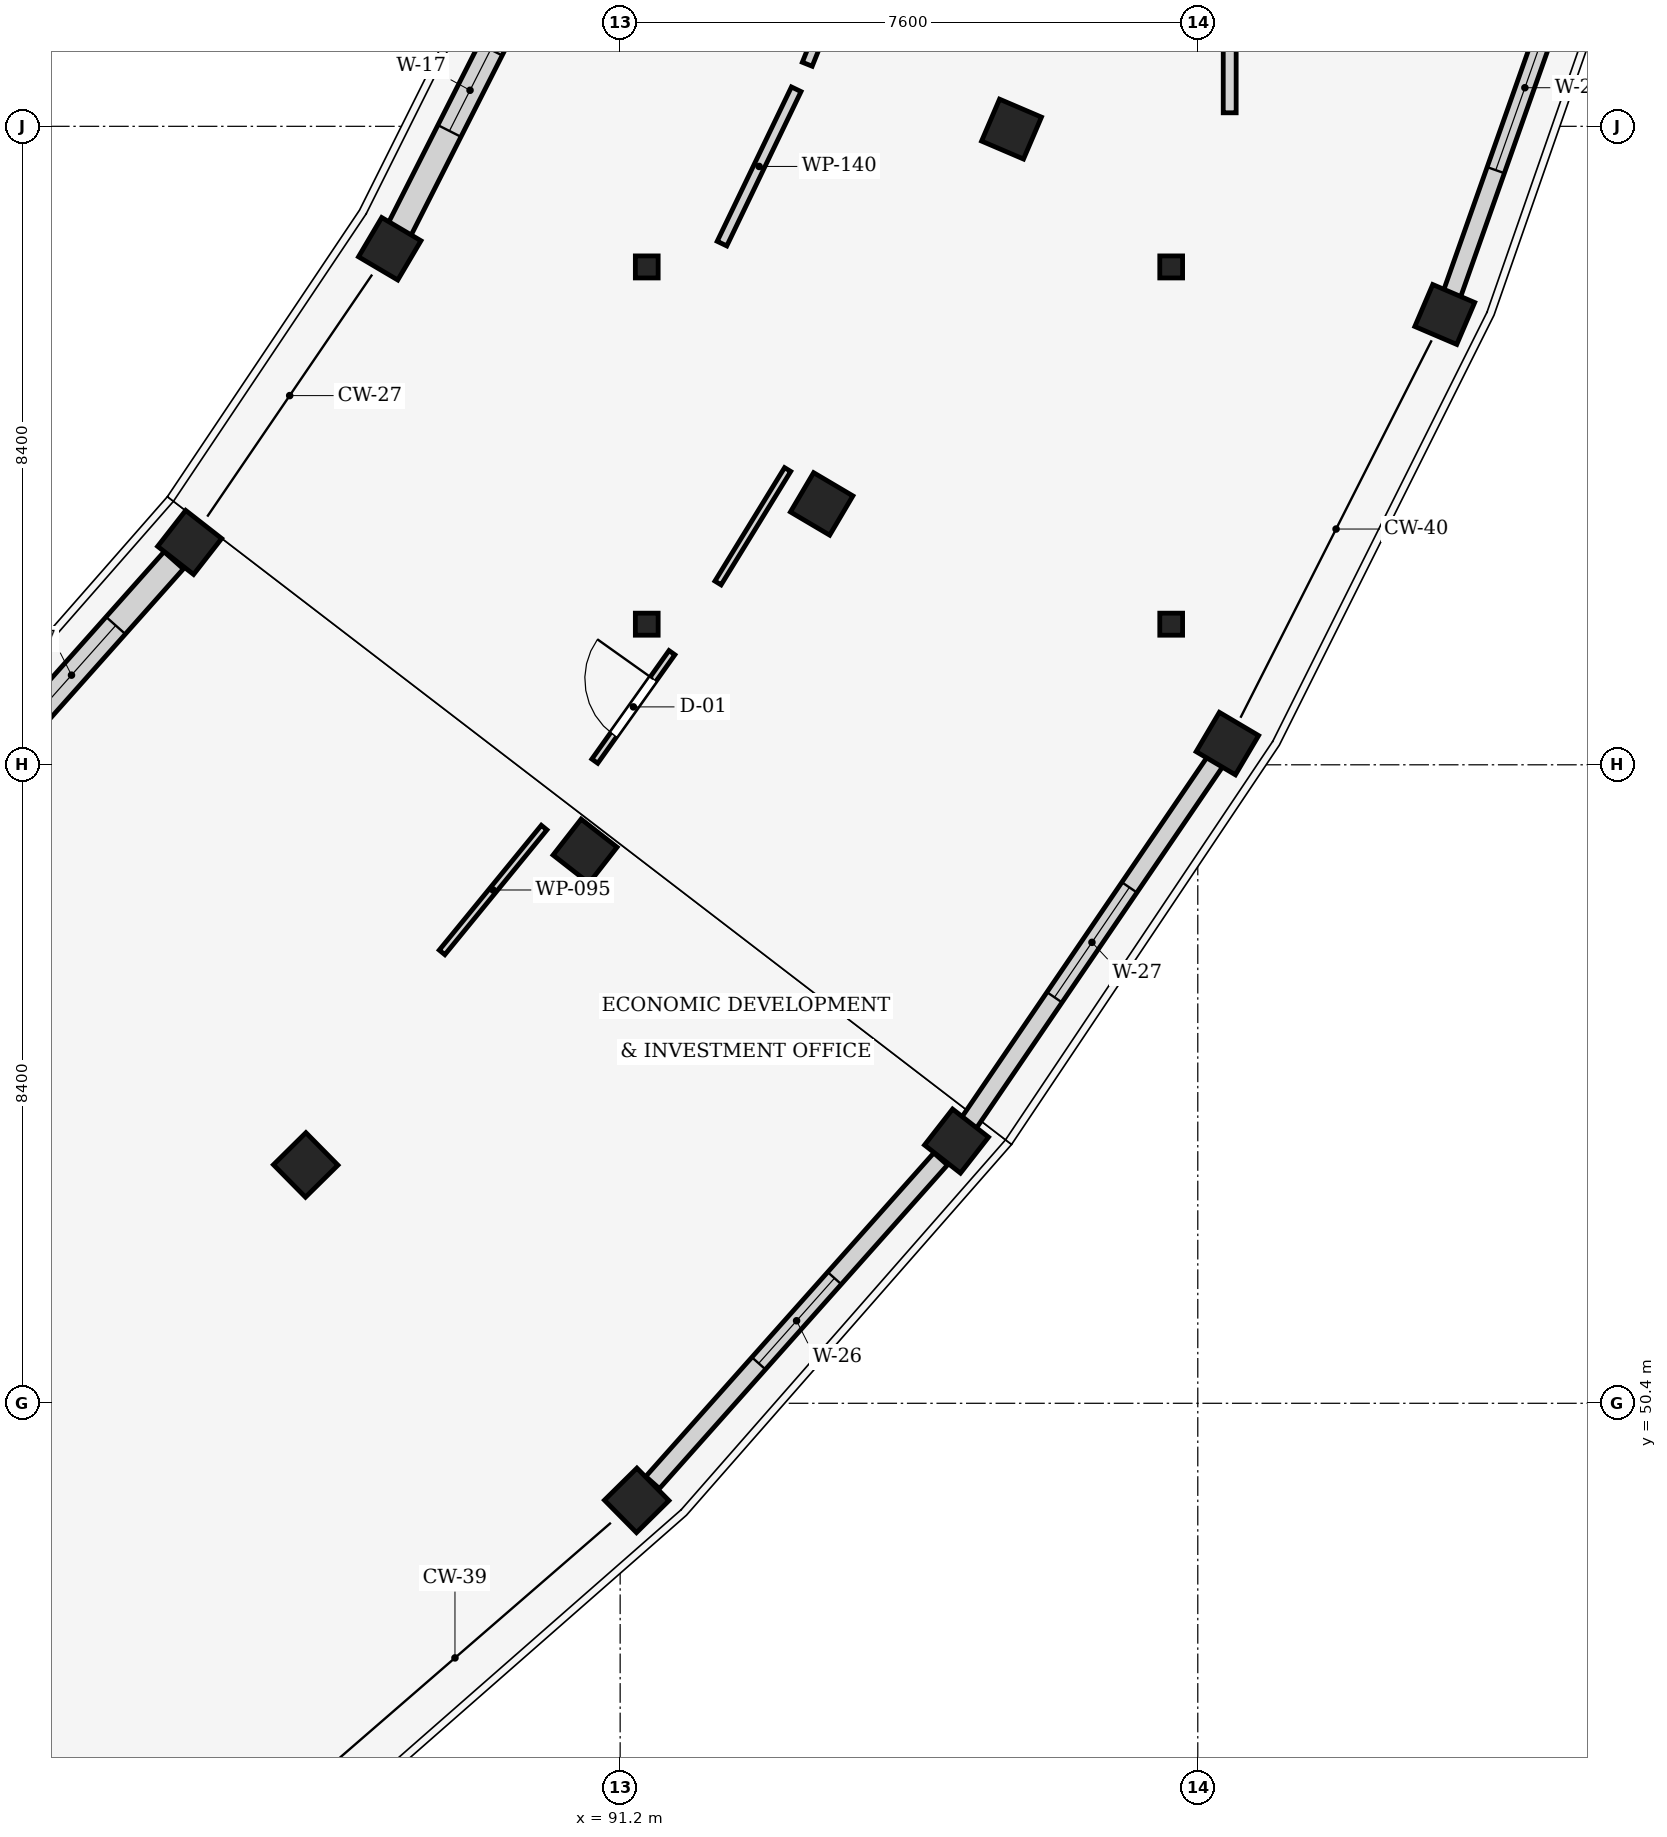
"""IFC4 building model, lengths in metres.
Left out: names, types, materials, properties, quantities, classifications, styles, units other than length and angle.
Written with IfcOpenShell. Run it as: python <this file> out.ifc"""

import sys

from ifc_helpers import new_model, si_unit, direction, frame, frame_2d, origin, origin_2d, place, context, subcontext, project, spatial, rectangle, i_section, extrude, element, fill, save


model = new_model("IFC4")
c1 = context("Model", 3, precision=1e-05, world=origin(), true_north=direction((0.0, 1.0)))
c2 = subcontext(c1, "Body", "Model", "MODEL_VIEW")
j1 = project(units=[si_unit("LENGTHUNIT", "METRE"), si_unit("PLANEANGLEUNIT", "RADIAN")], contexts=[c1])
p1 = place(None, origin())
s1 = spatial("IfcSite", under=j1, at=p1, CompositionType="ELEMENT")
p2 = place(p1, origin())
s2 = spatial("IfcBuilding", under=s1, at=p2, CompositionType="ELEMENT")
p3 = place(p2, frame((0.0, 0.0, 13.2)))
s3 = spatial("IfcBuildingStorey", under=s2, at=p3, CompositionType="ELEMENT", Elevation=13.2)
for number, where, z_axis, x_axis in (
    (1, (87.063, 53.536, 0.0), (0.0, 0.0, 1.0), (0.702, -0.712, 0.0)),
    (2, (91.418, 49.123, 0.0), (0.0, 0.0, 1.0), (0.702, -0.712, 0.0)),
    (3, (85.536, 61.726, 0.0), (0.0, 0.0, 1.0), (0.788, -0.615, 0.0)),
    (4, (90.738, 57.664, 0.0), (0.0, 0.0, 1.0), (0.788, -0.615, 0.0)),
    (5, (95.626, 53.849, 0.0), (0.0, 0.0, 1.0), (0.788, -0.615, 0.0)),
    (6, (88.168, 65.589, 0.0), (0.0, 0.0, 1.0), (0.861, -0.509, 0.0)),
    (7, (93.851, 62.232, 0.0), (0.0, 0.0, 1.0), (0.861, -0.509, 0.0)),
    (8, (99.189, 59.079, 0.0), (0.0, 0.0, 1.0), (0.861, -0.509, 0.0)),
    (9, (96.349, 67.163, 0.0), (0.0, 0.0, 1.0), (0.919, -0.393, 0.0)),
    (10, (102.049, 64.724, 0.0), (0.0, 0.0, 1.0), (0.919, -0.393, 0.0)),
):
    element("IfcColumn", number, at=place(p3, frame(where, z_axis=z_axis, x_axis=x_axis)), inside=s3, PredefinedType="COLUMN", context=c2, shape_type="SweptSolid", body=[
        extrude(rectangle(XDim=0.6, YDim=0.6, at=origin_2d()), origin(), (0.0, 0.0, 1.0), 4.05),
    ])
for number, where, z_axis, x_axis in (
    (11, (91.55, 60.65, 0.0), (0.0, 0.0, 1.0), (1.0, 0.0, 0.0)),
    (12, (98.45, 60.65, 0.0), (0.0, 0.0, 1.0), (1.0, 0.0, 0.0)),
    (13, (98.45, 65.35, 0.0), (0.0, 0.0, 1.0), (1.0, 0.0, 0.0)),
    (14, (91.55, 65.35, 0.0), (0.0, 0.0, 1.0), (1.0, 0.0, 0.0)),
):
    element("IfcColumn", number, at=place(p3, frame(where, z_axis=z_axis, x_axis=x_axis)), inside=s3, PredefinedType="COLUMN", context=c2, shape_type="SweptSolid", body=[
        extrude(i_section(OverallWidth=0.3, OverallDepth=0.29, WebThickness=0.009, FlangeThickness=0.014, at=origin_2d()), origin(), (0.0, 0.0, 1.0), 4.05),
    ])
p4 = place(p3, frame((95.417, 53.615, 0.0), z_axis=(0.0, 0.0, 1.0), x_axis=(-0.6649220167, -0.746912787217, 0.0)))
e15 = element("IfcWall", 15, at=p4, inside=s3, PredefinedType="STANDARD", context=c2, shape_type="SweptSolid", body=[
    extrude(rectangle(XDim=5.699, YDim=0.24, at=frame_2d((2.85, 0.0))), origin(), (0.0, 0.0, 1.0), 3.015),
])
p5 = place(p4, frame((2.1, 0.0, 0.85)))
e16 = element("IfcOpeningElement", 16, at=p5, cuts=e15, PredefinedType="OPENING", context=c2, shape_type="SweptSolid", body=[
    extrude(rectangle(XDim=1.5, YDim=1.85, at=frame_2d((0.75, 0.925))), frame((0.0, 0.13, 0.0), z_axis=(0.0, -1.0, 0.0), x_axis=(1.0, 0.0, 0.0)), (0.0, 0.0, 1.0), 0.26),
])
p6 = place(p3, frame((82.636, 58.469, 0.0), z_axis=(0.0, 0.0, 1.0), x_axis=(0.664947894459, 0.74688974933, 0.0)))
e17 = element("IfcWall", 17, at=p6, inside=s3, PredefinedType="STANDARD", context=c2, shape_type="SweptSolid", body=[
    extrude(rectangle(XDim=4.046, YDim=0.34, at=frame_2d((2.023, 0.0))), origin(), (0.0, 0.0, 1.0), 3.165),
])
p7 = place(p6, frame((1.148, 0.0, 0.85)))
e18 = element("IfcOpeningElement", 18, at=p7, cuts=e17, PredefinedType="OPENING", context=c2, shape_type="SweptSolid", body=[
    extrude(rectangle(XDim=1.75, YDim=1.85, at=frame_2d((0.875, 0.925))), frame((0.0, 0.18, 0.0), z_axis=(0.0, -1.0, 0.0), x_axis=(1.0, 0.0, 0.0)), (0.0, 0.0, 1.0), 0.36),
])
p8 = place(p3, frame((99.029, 58.844, 0.0), z_axis=(0.0, 0.0, 1.0), x_axis=(-0.563132935525, -0.826366321269, 0.0)))
e19 = element("IfcWall", 19, at=p8, inside=s3, PredefinedType="STANDARD", context=c2, shape_type="SweptSolid", body=[
    extrude(rectangle(XDim=5.76, YDim=0.24, at=frame_2d((2.88, 0.0))), origin(), (0.0, 0.0, 1.0), 3.015),
])
p9 = place(p8, frame((2.005, 0.0, 0.85)))
e20 = element("IfcOpeningElement", 20, at=p9, cuts=e19, PredefinedType="OPENING", context=c2, shape_type="SweptSolid", body=[
    extrude(rectangle(XDim=1.75, YDim=1.85, at=frame_2d((0.875, 0.925))), frame((0.0, 0.13, 0.0), z_axis=(0.0, -1.0, 0.0), x_axis=(1.0, 0.0, 0.0)), (0.0, 0.0, 1.0), 0.26),
])
p10 = place(p3, frame((88.288, 65.824, 0.0), z_axis=(0.0, 0.0, 1.0), x_axis=(0.451915465701, 0.89206076691, 0.0)))
e21 = element("IfcWall", 21, at=p10, inside=s3, PredefinedType="STANDARD", context=c2, shape_type="SweptSolid", body=[
    extrude(rectangle(XDim=4.148, YDim=0.34, at=frame_2d((2.074, 0.0))), origin(), (0.0, 0.0, 1.0), 3.015),
])
p11 = place(p10, frame((1.474, 0.0, 0.85)))
e22 = element("IfcOpeningElement", 22, at=p11, cuts=e21, PredefinedType="OPENING", context=c2, shape_type="SweptSolid", body=[
    extrude(rectangle(XDim=1.2, YDim=1.65, at=frame_2d((0.6, 0.825))), frame((0.0, 0.18, 0.0), z_axis=(0.0, -1.0, 0.0), x_axis=(1.0, 0.0, 0.0)), (0.0, 0.0, 1.0), 0.36),
])
p12 = place(p3, frame((104.075, 70.456, 0.0), z_axis=(0.0, 0.0, 1.0), x_axis=(-0.333212182882, -0.942851865978, 0.0)))
e23 = element("IfcWall", 23, at=p12, inside=s3, PredefinedType="STANDARD", context=c2, shape_type="SweptSolid", body=[
    extrude(rectangle(XDim=5.83, YDim=0.24, at=frame_2d((2.915, 0.0))), origin(), (0.0, 0.0, 1.0), 3.015),
])
p13 = place(p12, frame((1.765, 0.0, 0.85)))
e24 = element("IfcOpeningElement", 24, at=p13, cuts=e23, PredefinedType="OPENING", context=c2, shape_type="SweptSolid", body=[
    extrude(rectangle(XDim=2.3, YDim=1.85, at=frame_2d((1.15, 0.925))), frame((0.0, 0.13, 0.0), z_axis=(0.0, -1.0, 0.0), x_axis=(1.0, 0.0, 0.0)), (0.0, 0.0, 1.0), 0.26),
])
p14 = place(p3, frame((90.867, 58.848, 0.0), z_axis=(0.0, 0.0, 1.0), x_axis=(0.579416783783, 0.815031404715, 0.0)))
e25 = element("IfcWall", 25, at=p14, inside=s3, PredefinedType="PARTITIONING", context=c2, shape_type="SweptSolid", body=[
    extrude(rectangle(XDim=1.751, YDim=0.095, at=frame_2d((0.875, 0.0))), origin(), (0.0, 0.0, 1.0), 3.7),
])
p15 = place(p14, frame((0.426, 0.0, 0.0)))
e26 = element("IfcOpeningElement", 26, at=p15, cuts=e25, PredefinedType="OPENING", context=c2, shape_type="SweptSolid", body=[
    extrude(rectangle(XDim=0.9, YDim=2.1, at=frame_2d((0.45, 1.05))), frame((0.0, 0.057, 0.0), z_axis=(0.0, -1.0, 0.0), x_axis=(1.0, 0.0, 0.0)), (0.0, 0.0, 1.0), 0.115),
])
p16 = place(p3, frame((92.488, 61.192, 0.0), z_axis=(0.0, 0.0, 1.0), x_axis=(0.523101385983, 0.852270461757, 0.0)))
e27 = element("IfcWall", 27, at=p16, inside=s3, PredefinedType="PARTITIONING", context=c2, shape_type="SweptSolid", body=[
    extrude(rectangle(XDim=1.751, YDim=0.095, at=frame_2d((0.875, 0.0))), origin(), (0.0, 0.0, 1.0), 3.015),
])
p17 = place(p3, frame((88.857, 56.332, 0.0), z_axis=(0.0, 0.0, 1.0), x_axis=(0.633093635645, 0.774075221478, 0.0)))
e28 = element("IfcWall", 28, at=p17, inside=s3, PredefinedType="PARTITIONING", context=c2, shape_type="SweptSolid", body=[
    extrude(rectangle(XDim=2.121, YDim=0.095, at=frame_2d((1.061, 0.0))), origin(), (0.0, 0.0, 1.0), 3.015),
])
p18 = place(p3, frame((99.22, 67.378, 0.0), z_axis=(0.0, 0.0, 1.0), x_axis=(0.0, 1.0, 0.0)))
e29 = element("IfcWall", 29, at=p18, inside=s3, PredefinedType="PARTITIONING", context=c2, shape_type="SweptSolid", body=[
    extrude(rectangle(XDim=2.542, YDim=0.17, at=frame_2d((1.271, 0.0))), origin(), (0.0, 0.0, 1.0), 3.7),
])
p19 = place(p3, frame((94.504, 70.107, 0.0), z_axis=(0.0, 0.0, 1.0), x_axis=(-0.373687233103, -0.927554770251, 0.0)))
e30 = element("IfcWall", 30, at=p19, inside=s3, PredefinedType="PARTITIONING", context=c2, shape_type="SweptSolid", body=[
    extrude(rectangle(XDim=2.253, YDim=0.14, at=frame_2d((1.127, 0.0))), origin(), (0.0, 0.0, 1.0), 3.7),
])
p20 = place(p19, frame((0.602, 0.0, 0.0)))
e31 = element("IfcOpeningElement", 31, at=p20, cuts=e30, PredefinedType="OPENING", context=c2, shape_type="SweptSolid", body=[
    extrude(rectangle(XDim=1.05, YDim=2.1, at=frame_2d((0.525, 1.05))), frame((0.0, 0.08, 0.0), z_axis=(0.0, -1.0, 0.0), x_axis=(1.0, 0.0, 0.0)), (0.0, 0.0, 1.0), 0.16),
])
p21 = place(p3, frame((93.517, 67.688, 0.0), z_axis=(0.0, 0.0, 1.0), x_axis=(-0.433379051878, -0.90121173838, 0.0)))
e32 = element("IfcWall", 32, at=p21, inside=s3, PredefinedType="PARTITIONING", context=c2, shape_type="SweptSolid", body=[
    extrude(rectangle(XDim=2.253, YDim=0.14, at=frame_2d((1.127, 0.0))), origin(), (0.0, 0.0, 1.0), 3.7),
])
p22 = place(p5, origin())
e33 = element("IfcWindow", 33, at=p22, inside=s3, PartitioningType="SINGLE_PANEL", PredefinedType="WINDOW", context=c2, shape_type="SweptSolid", body=[
    extrude(rectangle(XDim=1.5, YDim=1.85, at=frame_2d((0.75, 0.925))), frame((0.0, 0.03, 0.0), z_axis=(0.0, -1.0, 0.0), x_axis=(1.0, 0.0, 0.0)), (0.0, 0.0, 1.0), 0.06),
])
fill(e16, e33)
p23 = place(p7, origin())
e34 = element("IfcWindow", 34, at=p23, inside=s3, PartitioningType="SINGLE_PANEL", PredefinedType="WINDOW", context=c2, shape_type="SweptSolid", body=[
    extrude(rectangle(XDim=1.75, YDim=1.85, at=frame_2d((0.875, 0.925))), frame((0.0, 0.03, 0.0), z_axis=(0.0, -1.0, 0.0), x_axis=(1.0, 0.0, 0.0)), (0.0, 0.0, 1.0), 0.06),
])
fill(e18, e34)
p24 = place(p9, origin())
e35 = element("IfcWindow", 35, at=p24, inside=s3, PartitioningType="SINGLE_PANEL", PredefinedType="WINDOW", context=c2, shape_type="SweptSolid", body=[
    extrude(rectangle(XDim=1.75, YDim=1.85, at=frame_2d((0.875, 0.925))), frame((0.0, 0.03, 0.0), z_axis=(0.0, -1.0, 0.0), x_axis=(1.0, 0.0, 0.0)), (0.0, 0.0, 1.0), 0.06),
])
fill(e20, e35)
p25 = place(p11, origin())
e36 = element("IfcWindow", 36, at=p25, inside=s3, PartitioningType="SINGLE_PANEL", PredefinedType="WINDOW", context=c2, shape_type="SweptSolid", body=[
    extrude(rectangle(XDim=1.2, YDim=1.65, at=frame_2d((0.6, 0.825))), frame((0.0, 0.03, 0.0), z_axis=(0.0, -1.0, 0.0), x_axis=(1.0, 0.0, 0.0)), (0.0, 0.0, 1.0), 0.06),
])
fill(e22, e36)
p26 = place(p13, origin())
e37 = element("IfcWindow", 37, at=p26, inside=s3, PartitioningType="SINGLE_PANEL", PredefinedType="WINDOW", context=c2, shape_type="SweptSolid", body=[
    extrude(rectangle(XDim=2.3, YDim=1.85, at=frame_2d((1.15, 0.925))), frame((0.0, 0.03, 0.0), z_axis=(0.0, -1.0, 0.0), x_axis=(1.0, 0.0, 0.0)), (0.0, 0.0, 1.0), 0.06),
])
fill(e24, e37)
p27 = place(p15, origin())
e38 = element("IfcDoor", 38, at=p27, inside=s3, OperationType="SINGLE_SWING_RIGHT", PredefinedType="DOOR", context=c2, shape_type="SweptSolid", body=[
    extrude(rectangle(XDim=0.9, YDim=2.1, at=frame_2d((0.45, 1.05))), frame((0.0, 0.025, 0.0), z_axis=(0.0, -1.0, 0.0), x_axis=(1.0, 0.0, 0.0)), (0.0, 0.0, 1.0), 0.05),
])
fill(e26, e38)
save(model, sys.argv[1])
